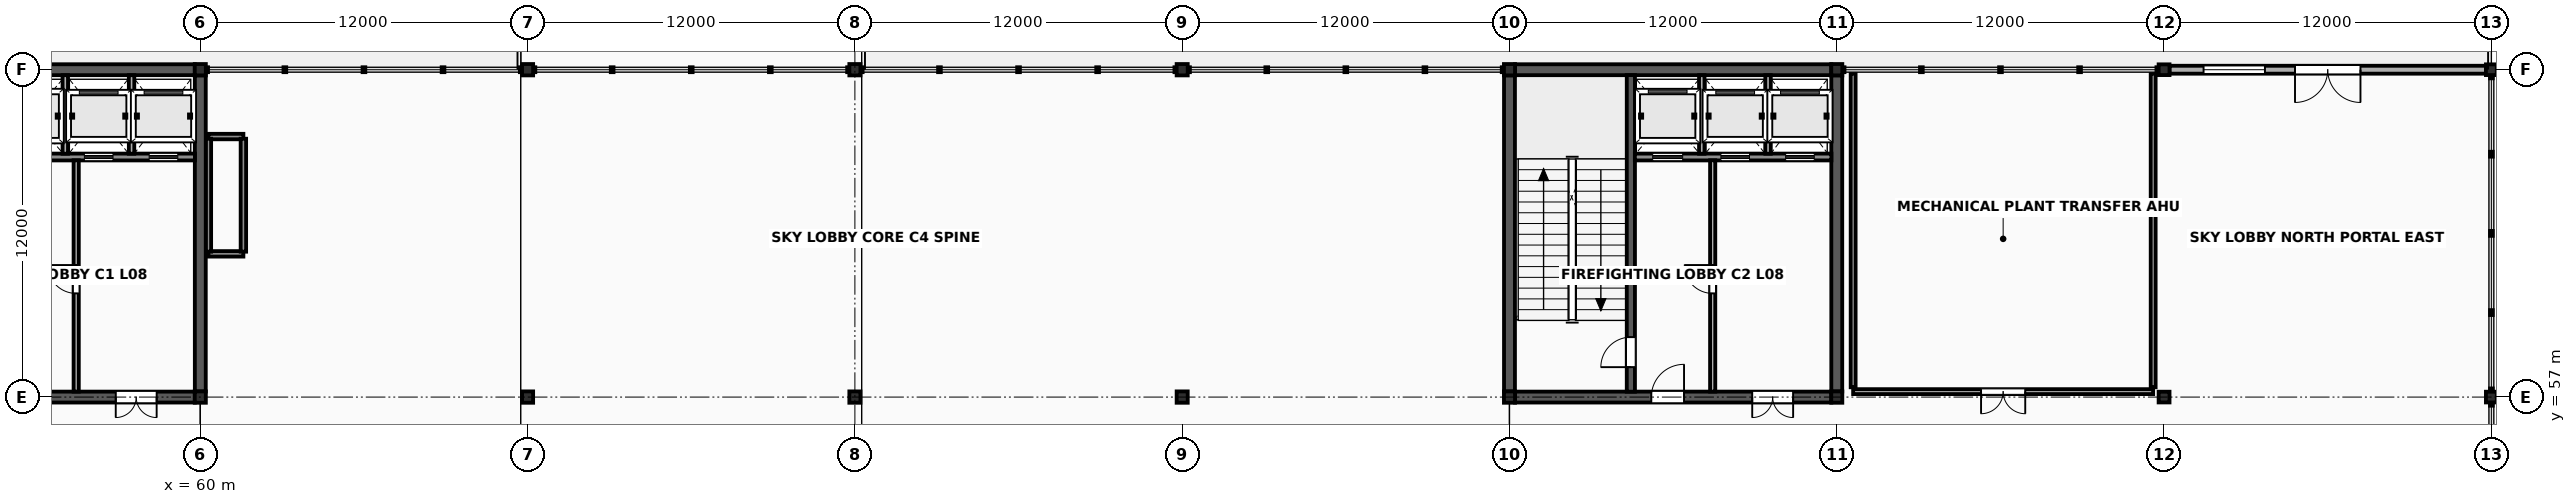
"""IFC4 building model, lengths in metres.
Left out: names, types, materials, properties, quantities, classifications, styles, units other than length and angle.
Written with IfcOpenShell. Run it as: python <this file> out.ifc"""

import sys

from ifc_helpers import new_model, si_unit, direction, frame, frame_2d, origin, origin_2d, place, context, subcontext, project, spatial, rectangle, i_section, extrude, element, fill, save


model = new_model("IFC4")
c1 = context("Model", 3, precision=1e-05, world=origin(), true_north=direction((0.0, 1.0)))
c2 = subcontext(c1, "Body", "Model", "MODEL_VIEW")
j1 = project(units=[si_unit("LENGTHUNIT", "METRE"), si_unit("PLANEANGLEUNIT", "RADIAN")], contexts=[c1])
p1 = place(None, origin())
s1 = spatial("IfcSite", under=j1, at=p1, CompositionType="ELEMENT")
p2 = place(p1, origin())
s2 = spatial("IfcBuilding", under=s1, at=p2, CompositionType="ELEMENT")
p3 = place(p2, frame((0.0, 0.0, 32.4)))
s3 = spatial("IfcBuildingStorey", under=s2, at=p3, CompositionType="ELEMENT", Elevation=32.4)
for number, where, z_axis, x_axis in (
    (1, (60.0, 57.0, 0.0), (0.0, 0.0, 1.0), (1.0, 0.0, 0.0)),
    (2, (60.0, 69.0, 0.0), (0.0, 0.0, 1.0), (1.0, 0.0, 0.0)),
    (3, (72.0, 57.0, 0.0), (0.0, 0.0, 1.0), (1.0, 0.0, 0.0)),
    (4, (72.0, 69.0, 0.0), (0.0, 0.0, 1.0), (1.0, 0.0, 0.0)),
    (5, (84.0, 57.0, 0.0), (0.0, 0.0, 1.0), (1.0, 0.0, 0.0)),
    (6, (84.0, 69.0, 0.0), (0.0, 0.0, 1.0), (1.0, 0.0, 0.0)),
    (7, (96.0, 57.0, 0.0), (0.0, 0.0, 1.0), (1.0, 0.0, 0.0)),
    (8, (96.0, 69.0, 0.0), (0.0, 0.0, 1.0), (1.0, 0.0, 0.0)),
    (9, (108.0, 57.0, 0.0), (0.0, 0.0, 1.0), (1.0, 0.0, 0.0)),
    (10, (108.0, 69.0, 0.0), (0.0, 0.0, 1.0), (1.0, 0.0, 0.0)),
    (11, (120.0, 57.0, 0.0), (0.0, 0.0, 1.0), (1.0, 0.0, 0.0)),
    (12, (120.0, 69.0, 0.0), (0.0, 0.0, 1.0), (1.0, 0.0, 0.0)),
):
    element("IfcColumn", number, at=place(p3, frame(where, z_axis=z_axis, x_axis=x_axis)), inside=s3, PredefinedType="COLUMN", context=c2, shape_type="SweptSolid", body=[
        extrude(i_section(OverallWidth=0.406, OverallDepth=0.416, WebThickness=0.03, FlangeThickness=0.048, FilletRadius=0.018, at=origin_2d()), origin(), (0.0, 0.0, 1.0), 5.2),
    ])
for number, where, z_axis, x_axis in (
    (13, (132.0, 57.0, 0.0), (0.0, 0.0, 1.0), (1.0, 0.0, 0.0)),
    (14, (132.0, 69.0, 0.0), (0.0, 0.0, 1.0), (1.0, 0.0, 0.0)),
    (15, (144.0, 57.0, 0.0), (0.0, 0.0, 1.0), (1.0, 0.0, 0.0)),
    (16, (144.0, 69.0, 0.0), (0.0, 0.0, 1.0), (1.0, 0.0, 0.0)),
):
    element("IfcColumn", number, at=place(p3, frame(where, z_axis=z_axis, x_axis=x_axis)), inside=s3, PredefinedType="COLUMN", context=c2, shape_type="SweptSolid", body=[
        extrude(i_section(OverallWidth=0.399, OverallDepth=0.393, WebThickness=0.023, FlangeThickness=0.037, FilletRadius=0.018, at=origin_2d()), origin(), (0.0, 0.0, 1.0), 5.2),
    ])
for number, where, z_axis, x_axis in (
    (17, (60.297, 62.25, 0.0), (0.0, 0.0, 1.0), (1.0, 0.0, 0.0)),
    (18, (60.297, 66.55, 0.0), (0.0, 0.0, 1.0), (1.0, 0.0, 0.0)),
):
    element("IfcWall", number, at=place(p3, frame(where, z_axis=z_axis, x_axis=x_axis)), inside=s3, PredefinedType="SOLIDWALL", context=c2, shape_type="SweptSolid", body=[
        extrude(rectangle(XDim=1.283, YDim=0.2, at=frame_2d((0.642, 0.0))), origin(), (0.0, 0.0, 1.0), 5.043),
    ])
for number, where, z_axis, x_axis in (
    (19, (60.297, 62.33, 0.0), (0.0, 0.0, 1.0), (0.0, 1.0, 0.0)),
    (20, (61.58, 62.33, 0.0), (0.0, 0.0, 1.0), (0.0, 1.0, 0.0)),
):
    element("IfcWall", number, at=place(p3, frame(where, z_axis=z_axis, x_axis=x_axis)), inside=s3, PredefinedType="SOLIDWALL", context=c2, shape_type="SweptSolid", body=[
        extrude(rectangle(XDim=4.14, YDim=0.2, at=frame_2d((2.07, 0.0))), origin(), (0.0, 0.0, 1.0), 5.043),
    ])
p4 = place(p3, frame((48.2, 57.0, 0.0), z_axis=(0.0, 0.0, 1.0), x_axis=(1.0, 0.0, 0.0)))
e21 = element("IfcWall", 21, at=p4, inside=s3, PredefinedType="SHEAR", context=c2, shape_type="SweptSolid", body=[
    extrude(rectangle(XDim=11.6, YDim=0.4, at=frame_2d((5.8, 0.0))), origin(), (0.0, 0.0, 1.0), 5.043),
])
p5 = place(p4, frame((5.0, 0.0, 0.0)))
e22 = element("IfcOpeningElement", 22, at=p5, cuts=e21, PredefinedType="OPENING", context=c2, shape_type="SweptSolid", body=[
    extrude(rectangle(XDim=1.2, YDim=2.2, at=frame_2d((0.6, 1.1))), frame((0.0, 0.215, 0.0), z_axis=(0.0, -1.0, 0.0), x_axis=(1.0, 0.0, 0.0)), (0.0, 0.0, 1.0), 0.43),
])
p6 = place(p4, frame((8.7, 0.0, 0.0)))
e23 = element("IfcOpeningElement", 23, at=p6, cuts=e21, PredefinedType="OPENING", context=c2, shape_type="SweptSolid", body=[
    extrude(rectangle(XDim=1.5, YDim=2.25, at=frame_2d((0.75, 1.125))), frame((0.0, 0.215, 0.0), z_axis=(0.0, -1.0, 0.0), x_axis=(1.0, 0.0, 0.0)), (0.0, 0.0, 1.0), 0.43),
])
p7 = place(p3, frame((48.2, 69.0, 0.0), z_axis=(0.0, 0.0, 1.0), x_axis=(1.0, 0.0, 0.0)))
e24 = element("IfcWall", 24, at=p7, inside=s3, PredefinedType="SHEAR", context=c2, shape_type="SweptSolid", body=[
    extrude(rectangle(XDim=11.6, YDim=0.4, at=frame_2d((5.8, 0.0))), origin(), (0.0, 0.0, 1.0), 5.043),
])
p8 = place(p3, frame((60.0, 57.205, 0.0), z_axis=(0.0, 0.0, 1.0), x_axis=(0.0, 1.0, 0.0)))
e25 = element("IfcWall", 25, at=p8, inside=s3, PredefinedType="SHEAR", context=c2, shape_type="SweptSolid", body=[
    extrude(rectangle(XDim=11.59, YDim=0.4, at=frame_2d((5.795, 0.0))), origin(), (0.0, 0.0, 1.0), 5.043),
])
p9 = place(p3, frame((52.597, 65.8, 0.0), z_axis=(0.0, 0.0, 1.0), x_axis=(1.0, 0.0, 0.0)))
e26 = element("IfcWall", 26, at=p9, inside=s3, PredefinedType="SOLIDWALL", context=c2, shape_type="SweptSolid", body=[
    extrude(rectangle(XDim=7.206, YDim=0.25, at=frame_2d((3.603, 0.0))), origin(), (0.0, 0.0, 1.0), 5.043),
])
p10 = place(p9, frame((0.653, 0.0, 0.0)))
e27 = element("IfcOpeningElement", 27, at=p10, cuts=e26, PredefinedType="OPENING", context=c2, shape_type="SweptSolid", body=[
    extrude(rectangle(XDim=1.1, YDim=2.24, at=frame_2d((0.55, 1.12))), frame((0.0, 0.14, 0.0), z_axis=(0.0, -1.0, 0.0), x_axis=(1.0, 0.0, 0.0)), (0.0, 0.0, 1.0), 0.28),
])
p11 = place(p9, frame((3.153, 0.0, 0.0)))
e28 = element("IfcOpeningElement", 28, at=p11, cuts=e26, PredefinedType="OPENING", context=c2, shape_type="SweptSolid", body=[
    extrude(rectangle(XDim=1.05, YDim=2.2, at=frame_2d((0.525, 1.1))), frame((0.0, 0.14, 0.0), z_axis=(0.0, -1.0, 0.0), x_axis=(1.0, 0.0, 0.0)), (0.0, 0.0, 1.0), 0.28),
])
p12 = place(p9, frame((5.528, 0.0, 0.0)))
e29 = element("IfcOpeningElement", 29, at=p12, cuts=e26, PredefinedType="OPENING", context=c2, shape_type="SweptSolid", body=[
    extrude(rectangle(XDim=1.05, YDim=2.2, at=frame_2d((0.525, 1.1))), frame((0.0, 0.14, 0.0), z_axis=(0.0, -1.0, 0.0), x_axis=(1.0, 0.0, 0.0)), (0.0, 0.0, 1.0), 0.28),
])
for number, where, z_axis, x_axis in (
    (30, (55.05, 65.92, 0.0), (0.0, 0.0, 1.0), (0.0, 1.0, 0.0)),
    (31, (57.48, 65.92, 0.0), (0.0, 0.0, 1.0), (0.0, 1.0, 0.0)),
):
    element("IfcWall", number, at=place(p3, frame(where, z_axis=z_axis, x_axis=x_axis)), inside=s3, PredefinedType="SOLIDWALL", context=c2, shape_type="SweptSolid", body=[
        extrude(rectangle(XDim=2.88, YDim=0.2, at=frame_2d((1.44, 0.0))), origin(), (0.0, 0.0, 1.0), 5.033),
    ])
p13 = place(p3, frame((55.45, 57.2, 0.0), z_axis=(0.0, 0.0, 1.0), x_axis=(0.0, 1.0, 0.0)))
e32 = element("IfcWall", 32, at=p13, inside=s3, PredefinedType="SOLIDWALL", context=c2, shape_type="SweptSolid", body=[
    extrude(rectangle(XDim=8.48, YDim=0.19, at=frame_2d((4.24, 0.0))), origin(), (0.0, 0.0, 1.0), 5.033),
])
p14 = place(p13, frame((3.6, 0.0, 0.0)))
e33 = element("IfcOpeningElement", 33, at=p14, cuts=e32, PredefinedType="OPENING", context=c2, shape_type="SweptSolid", body=[
    extrude(rectangle(XDim=1.04, YDim=2.18, at=frame_2d((0.52, 1.09))), frame((0.0, 0.11, 0.0), z_axis=(0.0, -1.0, 0.0), x_axis=(1.0, 0.0, 0.0)), (0.0, 0.0, 1.0), 0.22),
])
p15 = place(p3, frame((108.2, 57.0, 0.0), z_axis=(0.0, 0.0, 1.0), x_axis=(1.0, 0.0, 0.0)))
e34 = element("IfcWall", 34, at=p15, inside=s3, PredefinedType="SHEAR", context=c2, shape_type="SweptSolid", body=[
    extrude(rectangle(XDim=11.6, YDim=0.4, at=frame_2d((5.8, 0.0))), origin(), (0.0, 0.0, 1.0), 5.043),
])
p16 = place(p15, frame((5.0, 0.0, 0.0)))
e35 = element("IfcOpeningElement", 35, at=p16, cuts=e34, PredefinedType="OPENING", context=c2, shape_type="SweptSolid", body=[
    extrude(rectangle(XDim=1.2, YDim=2.2, at=frame_2d((0.6, 1.1))), frame((0.0, 0.215, 0.0), z_axis=(0.0, -1.0, 0.0), x_axis=(1.0, 0.0, 0.0)), (0.0, 0.0, 1.0), 0.43),
])
p17 = place(p15, frame((8.7, 0.0, 0.0)))
e36 = element("IfcOpeningElement", 36, at=p17, cuts=e34, PredefinedType="OPENING", context=c2, shape_type="SweptSolid", body=[
    extrude(rectangle(XDim=1.5, YDim=2.25, at=frame_2d((0.75, 1.125))), frame((0.0, 0.215, 0.0), z_axis=(0.0, -1.0, 0.0), x_axis=(1.0, 0.0, 0.0)), (0.0, 0.0, 1.0), 0.43),
])
p18 = place(p3, frame((108.2, 69.0, 0.0), z_axis=(0.0, 0.0, 1.0), x_axis=(1.0, 0.0, 0.0)))
e37 = element("IfcWall", 37, at=p18, inside=s3, PredefinedType="SHEAR", context=c2, shape_type="SweptSolid", body=[
    extrude(rectangle(XDim=11.6, YDim=0.4, at=frame_2d((5.8, 0.0))), origin(), (0.0, 0.0, 1.0), 5.043),
])
for number, where, z_axis, x_axis in (
    (38, (108.0, 57.205, 0.0), (0.0, 0.0, 1.0), (0.0, 1.0, 0.0)),
    (39, (120.0, 57.205, 0.0), (0.0, 0.0, 1.0), (0.0, 1.0, 0.0)),
):
    element("IfcWall", number, at=place(p3, frame(where, z_axis=z_axis, x_axis=x_axis)), inside=s3, PredefinedType="SHEAR", context=c2, shape_type="SweptSolid", body=[
        extrude(rectangle(XDim=11.59, YDim=0.4, at=frame_2d((5.795, 0.0))), origin(), (0.0, 0.0, 1.0), 5.043),
    ])
p19 = place(p3, frame((112.45, 57.197, 0.0), z_axis=(0.0, 0.0, 1.0), x_axis=(0.0, 1.0, 0.0)))
e40 = element("IfcWall", 40, at=p19, inside=s3, PredefinedType="SHEAR", context=c2, shape_type="SweptSolid", body=[
    extrude(rectangle(XDim=11.606, YDim=0.3, at=frame_2d((5.803, 0.0))), origin(), (0.0, 0.0, 1.0), 5.043),
])
p20 = place(p19, frame((0.9, 0.0, 0.0)))
e41 = element("IfcOpeningElement", 41, at=p20, cuts=e40, PredefinedType="OPENING", context=c2, shape_type="SweptSolid", body=[
    extrude(rectangle(XDim=1.1, YDim=2.2, at=frame_2d((0.55, 1.1))), frame((0.0, 0.165, 0.0), z_axis=(0.0, -1.0, 0.0), x_axis=(1.0, 0.0, 0.0)), (0.0, 0.0, 1.0), 0.33),
])
p21 = place(p3, frame((112.597, 65.8, 0.0), z_axis=(0.0, 0.0, 1.0), x_axis=(1.0, 0.0, 0.0)))
e42 = element("IfcWall", 42, at=p21, inside=s3, PredefinedType="SOLIDWALL", context=c2, shape_type="SweptSolid", body=[
    extrude(rectangle(XDim=7.206, YDim=0.25, at=frame_2d((3.603, 0.0))), origin(), (0.0, 0.0, 1.0), 5.043),
])
p22 = place(p21, frame((0.653, 0.0, 0.0)))
e43 = element("IfcOpeningElement", 43, at=p22, cuts=e42, PredefinedType="OPENING", context=c2, shape_type="SweptSolid", body=[
    extrude(rectangle(XDim=1.1, YDim=2.24, at=frame_2d((0.55, 1.12))), frame((0.0, 0.14, 0.0), z_axis=(0.0, -1.0, 0.0), x_axis=(1.0, 0.0, 0.0)), (0.0, 0.0, 1.0), 0.28),
])
p23 = place(p21, frame((3.153, 0.0, 0.0)))
e44 = element("IfcOpeningElement", 44, at=p23, cuts=e42, PredefinedType="OPENING", context=c2, shape_type="SweptSolid", body=[
    extrude(rectangle(XDim=1.05, YDim=2.2, at=frame_2d((0.525, 1.1))), frame((0.0, 0.14, 0.0), z_axis=(0.0, -1.0, 0.0), x_axis=(1.0, 0.0, 0.0)), (0.0, 0.0, 1.0), 0.28),
])
p24 = place(p21, frame((5.528, 0.0, 0.0)))
e45 = element("IfcOpeningElement", 45, at=p24, cuts=e42, PredefinedType="OPENING", context=c2, shape_type="SweptSolid", body=[
    extrude(rectangle(XDim=1.05, YDim=2.2, at=frame_2d((0.525, 1.1))), frame((0.0, 0.14, 0.0), z_axis=(0.0, -1.0, 0.0), x_axis=(1.0, 0.0, 0.0)), (0.0, 0.0, 1.0), 0.28),
])
for number, where, z_axis, x_axis in (
    (46, (115.05, 65.92, 0.0), (0.0, 0.0, 1.0), (0.0, 1.0, 0.0)),
    (47, (117.48, 65.92, 0.0), (0.0, 0.0, 1.0), (0.0, 1.0, 0.0)),
):
    element("IfcWall", number, at=place(p3, frame(where, z_axis=z_axis, x_axis=x_axis)), inside=s3, PredefinedType="SOLIDWALL", context=c2, shape_type="SweptSolid", body=[
        extrude(rectangle(XDim=2.88, YDim=0.2, at=frame_2d((1.44, 0.0))), origin(), (0.0, 0.0, 1.0), 5.033),
    ])
p25 = place(p3, frame((115.45, 57.2, 0.0), z_axis=(0.0, 0.0, 1.0), x_axis=(0.0, 1.0, 0.0)))
e48 = element("IfcWall", 48, at=p25, inside=s3, PredefinedType="SOLIDWALL", context=c2, shape_type="SweptSolid", body=[
    extrude(rectangle(XDim=8.48, YDim=0.19, at=frame_2d((4.24, 0.0))), origin(), (0.0, 0.0, 1.0), 5.033),
])
p26 = place(p25, frame((3.6, 0.0, 0.0)))
e49 = element("IfcOpeningElement", 49, at=p26, cuts=e48, PredefinedType="OPENING", context=c2, shape_type="SweptSolid", body=[
    extrude(rectangle(XDim=1.04, YDim=2.18, at=frame_2d((0.52, 1.09))), frame((0.0, 0.11, 0.0), z_axis=(0.0, -1.0, 0.0), x_axis=(1.0, 0.0, 0.0)), (0.0, 0.0, 1.0), 0.22),
])
p27 = place(p3, frame((132.198, 69.0, 0.0), z_axis=(0.0, 0.0, 1.0), x_axis=(1.0, 0.0, 0.0)))
e50 = element("IfcWall", 50, at=p27, inside=s3, PredefinedType="SOLIDWALL", context=c2, shape_type="SweptSolid", body=[
    extrude(rectangle(XDim=11.605, YDim=0.29, at=frame_2d((5.802, 0.0))), origin(), (0.0, 0.0, 1.0), 4.1),
])
p28 = place(p27, frame((4.603, 0.0, 0.0)))
e51 = element("IfcOpeningElement", 51, at=p28, cuts=e50, PredefinedType="OPENING", context=c2, shape_type="SweptSolid", body=[
    extrude(rectangle(XDim=2.4, YDim=2.54, at=frame_2d((1.2, 1.27))), frame((0.0, 0.16, 0.0), z_axis=(0.0, -1.0, 0.0), x_axis=(1.0, 0.0, 0.0)), (0.0, 0.0, 1.0), 0.32),
])
p29 = place(p27, frame((1.25, 0.0, 1.95)))
e52 = element("IfcOpeningElement", 52, at=p29, cuts=e50, PredefinedType="OPENING", context=c2, shape_type="SweptSolid", body=[
    extrude(rectangle(XDim=2.25, YDim=0.88, at=frame_2d((1.125, 0.44))), frame((0.0, 0.16, 0.0), z_axis=(0.0, -1.0, 0.0), x_axis=(1.0, 0.0, 0.0)), (0.0, 0.0, 1.0), 0.32),
])
p30 = place(p3, frame((120.6, 57.2, 0.0), z_axis=(0.0, 0.0, 1.0), x_axis=(1.0, 0.0, 0.0)))
e53 = element("IfcWall", 53, at=p30, inside=s3, PredefinedType="SOLIDWALL", context=c2, shape_type="SweptSolid", body=[
    extrude(rectangle(XDim=11.0, YDim=0.18, at=frame_2d((5.5, 0.0))), origin(), (0.0, 0.0, 1.0), 2.88),
])
p31 = place(p30, frame((4.69, 0.0, 0.0)))
e54 = element("IfcOpeningElement", 54, at=p31, cuts=e53, PredefinedType="OPENING", context=c2, shape_type="SweptSolid", body=[
    extrude(rectangle(XDim=1.62, YDim=2.3, at=frame_2d((0.81, 1.15))), frame((0.0, 0.105, 0.0), z_axis=(0.0, -1.0, 0.0), x_axis=(1.0, 0.0, 0.0)), (0.0, 0.0, 1.0), 0.21),
])
for number, where, z_axis, x_axis in (
    (55, (120.6, 57.36, 0.0), (0.0, 0.0, 1.0), (0.0, 1.0, 0.0)),
    (56, (131.6, 57.36, 0.0), (0.0, 0.0, 1.0), (0.0, 1.0, 0.0)),
):
    element("IfcWall", number, at=place(p3, frame(where, z_axis=z_axis, x_axis=x_axis)), inside=s3, PredefinedType="SOLIDWALL", context=c2, shape_type="SweptSolid", body=[
        extrude(rectangle(XDim=11.5, YDim=0.18, at=frame_2d((5.75, 0.0))), origin(), (0.0, 0.0, 1.0), 2.88),
    ])
p32 = place(p28, origin())
e57 = element("IfcDoor", 57, at=p32, inside=s3, OperationType="DOUBLE_DOOR_SINGLE_SWING", PredefinedType="DOOR", context=c2, shape_type="SweptSolid", body=[
    extrude(rectangle(XDim=2.4, YDim=2.54, at=frame_2d((1.2, 1.27))), frame((0.0, 0.025, 0.0), z_axis=(0.0, -1.0, 0.0), x_axis=(1.0, 0.0, 0.0)), (0.0, 0.0, 1.0), 0.05),
])
fill(e51, e57)
p33 = place(p29, origin())
e58 = element("IfcWindow", 58, at=p33, inside=s3, PartitioningType="DOUBLE_PANEL_VERTICAL", PredefinedType="USERDEFINED", context=c2, shape_type="SweptSolid", body=[
    extrude(rectangle(XDim=2.25, YDim=0.88, at=frame_2d((1.125, 0.44))), frame((0.0, 0.03, 0.0), z_axis=(0.0, -1.0, 0.0), x_axis=(1.0, 0.0, 0.0)), (0.0, 0.0, 1.0), 0.06),
])
fill(e52, e58)
p34 = place(p14, origin())
e59 = element("IfcDoor", 59, at=p34, inside=s3, OperationType="SINGLE_SWING_RIGHT", PredefinedType="DOOR", context=c2, shape_type="SweptSolid", body=[
    extrude(rectangle(XDim=1.04, YDim=2.18, at=frame_2d((0.52, 1.09))), frame((0.0, 0.025, 0.0), z_axis=(0.0, -1.0, 0.0), x_axis=(1.0, 0.0, 0.0)), (0.0, 0.0, 1.0), 0.05),
])
fill(e33, e59)
p35 = place(p6, origin())
e60 = element("IfcDoor", 60, at=p35, inside=s3, OperationType="DOUBLE_DOOR_SINGLE_SWING", PredefinedType="DOOR", context=c2, shape_type="SweptSolid", body=[
    extrude(rectangle(XDim=1.5, YDim=2.25, at=frame_2d((0.75, 1.125))), frame((0.0, 0.025, 0.0), z_axis=(0.0, -1.0, 0.0), x_axis=(1.0, 0.0, 0.0)), (0.0, 0.0, 1.0), 0.05),
])
fill(e23, e60)
p36 = place(p11, origin())
e61 = element("IfcDoor", 61, at=p36, inside=s3, OperationType="SLIDING_TO_LEFT", PredefinedType="USERDEFINED", context=c2, shape_type="SweptSolid", body=[
    extrude(rectangle(XDim=1.05, YDim=2.2, at=frame_2d((0.525, 1.1))), frame((0.0, 0.025, 0.0), z_axis=(0.0, -1.0, 0.0), x_axis=(1.0, 0.0, 0.0)), (0.0, 0.0, 1.0), 0.05),
])
fill(e28, e61)
p37 = place(p12, origin())
e62 = element("IfcDoor", 62, at=p37, inside=s3, OperationType="SLIDING_TO_LEFT", PredefinedType="USERDEFINED", context=c2, shape_type="SweptSolid", body=[
    extrude(rectangle(XDim=1.05, YDim=2.2, at=frame_2d((0.525, 1.1))), frame((0.0, 0.025, 0.0), z_axis=(0.0, -1.0, 0.0), x_axis=(1.0, 0.0, 0.0)), (0.0, 0.0, 1.0), 0.05),
])
fill(e29, e62)
p38 = place(p20, origin())
e63 = element("IfcDoor", 63, at=p38, inside=s3, OperationType="SINGLE_SWING_LEFT", PredefinedType="DOOR", context=c2, shape_type="SweptSolid", body=[
    extrude(rectangle(XDim=1.1, YDim=2.2, at=frame_2d((0.55, 1.1))), frame((0.0, 0.025, 0.0), z_axis=(0.0, -1.0, 0.0), x_axis=(1.0, 0.0, 0.0)), (0.0, 0.0, 1.0), 0.05),
])
fill(e41, e63)
p39 = place(p26, origin())
e64 = element("IfcDoor", 64, at=p39, inside=s3, OperationType="SINGLE_SWING_RIGHT", PredefinedType="DOOR", context=c2, shape_type="SweptSolid", body=[
    extrude(rectangle(XDim=1.04, YDim=2.18, at=frame_2d((0.52, 1.09))), frame((0.0, 0.025, 0.0), z_axis=(0.0, -1.0, 0.0), x_axis=(1.0, 0.0, 0.0)), (0.0, 0.0, 1.0), 0.05),
])
fill(e49, e64)
p40 = place(p16, origin())
e65 = element("IfcDoor", 65, at=p40, inside=s3, OperationType="SINGLE_SWING_RIGHT", PredefinedType="DOOR", context=c2, shape_type="SweptSolid", body=[
    extrude(rectangle(XDim=1.2, YDim=2.2, at=frame_2d((0.6, 1.1))), frame((0.0, 0.025, 0.0), z_axis=(0.0, -1.0, 0.0), x_axis=(1.0, 0.0, 0.0)), (0.0, 0.0, 1.0), 0.05),
])
fill(e35, e65)
p41 = place(p17, origin())
e66 = element("IfcDoor", 66, at=p41, inside=s3, OperationType="DOUBLE_DOOR_SINGLE_SWING", PredefinedType="DOOR", context=c2, shape_type="SweptSolid", body=[
    extrude(rectangle(XDim=1.5, YDim=2.25, at=frame_2d((0.75, 1.125))), frame((0.0, 0.025, 0.0), z_axis=(0.0, -1.0, 0.0), x_axis=(1.0, 0.0, 0.0)), (0.0, 0.0, 1.0), 0.05),
])
fill(e36, e66)
p42 = place(p22, origin())
e67 = element("IfcDoor", 67, at=p42, inside=s3, OperationType="SLIDING_TO_LEFT", PredefinedType="USERDEFINED", context=c2, shape_type="SweptSolid", body=[
    extrude(rectangle(XDim=1.1, YDim=2.24, at=frame_2d((0.55, 1.12))), frame((0.0, 0.025, 0.0), z_axis=(0.0, -1.0, 0.0), x_axis=(1.0, 0.0, 0.0)), (0.0, 0.0, 1.0), 0.05),
])
fill(e43, e67)
p43 = place(p23, origin())
e68 = element("IfcDoor", 68, at=p43, inside=s3, OperationType="SLIDING_TO_LEFT", PredefinedType="USERDEFINED", context=c2, shape_type="SweptSolid", body=[
    extrude(rectangle(XDim=1.05, YDim=2.2, at=frame_2d((0.525, 1.1))), frame((0.0, 0.025, 0.0), z_axis=(0.0, -1.0, 0.0), x_axis=(1.0, 0.0, 0.0)), (0.0, 0.0, 1.0), 0.05),
])
fill(e44, e68)
p44 = place(p24, origin())
e69 = element("IfcDoor", 69, at=p44, inside=s3, OperationType="SLIDING_TO_LEFT", PredefinedType="USERDEFINED", context=c2, shape_type="SweptSolid", body=[
    extrude(rectangle(XDim=1.05, YDim=2.2, at=frame_2d((0.525, 1.1))), frame((0.0, 0.025, 0.0), z_axis=(0.0, -1.0, 0.0), x_axis=(1.0, 0.0, 0.0)), (0.0, 0.0, 1.0), 0.05),
])
fill(e45, e69)
p45 = place(p31, origin())
e70 = element("IfcDoor", 70, at=p45, inside=s3, OperationType="DOUBLE_DOOR_SINGLE_SWING", PredefinedType="DOOR", context=c2, shape_type="SweptSolid", body=[
    extrude(rectangle(XDim=1.62, YDim=2.3, at=frame_2d((0.81, 1.15))), frame((0.0, 0.025, 0.0), z_axis=(0.0, -1.0, 0.0), x_axis=(1.0, 0.0, 0.0)), (0.0, 0.0, 1.0), 0.05),
])
fill(e54, e70)
save(model, sys.argv[1])
